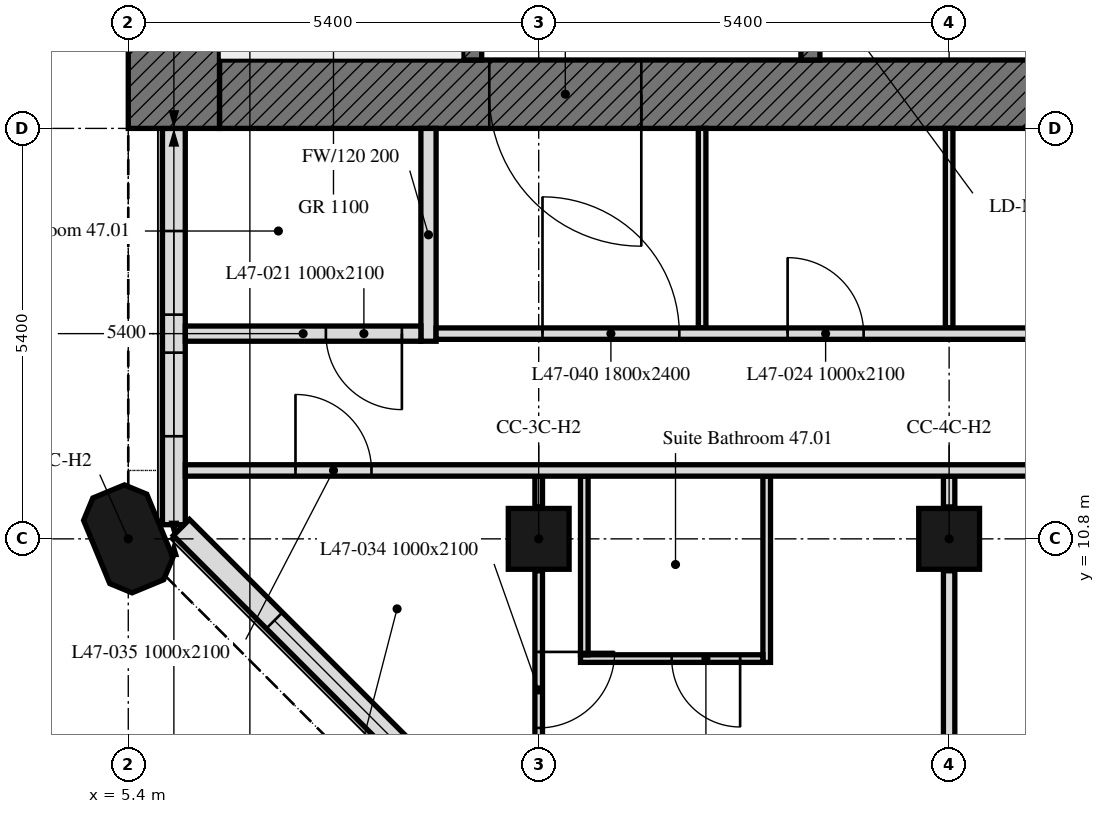
"""IFC4 building model, lengths in metres.
Left out: names, types, materials, properties, quantities, classifications, styles, units other than length and angle.
Written with IfcOpenShell. Run it as: python <this file> out.ifc"""

import sys

from ifc_helpers import new_model, si_unit, direction, frame, frame_2d, origin, origin_2d, place, context, subcontext, project, spatial, polyline, rectangle, outline, extrude, element, fill, save


model = new_model("IFC4")
c1 = context("Model", 3, precision=1e-05, world=origin(), true_north=direction((0.0, 1.0)))
c2 = subcontext(c1, "Body", "Model", "MODEL_VIEW")
j1 = project(units=[si_unit("LENGTHUNIT", "METRE"), si_unit("PLANEANGLEUNIT", "RADIAN")], contexts=[c1])
p1 = place(None, origin())
s1 = spatial("IfcSite", under=j1, at=p1, CompositionType="ELEMENT")
p2 = place(p1, origin())
s2 = spatial("IfcBuilding", under=s1, at=p2, CompositionType="ELEMENT")
p3 = place(p2, frame((0.0, 0.0, 193.9)))
s3 = spatial("IfcBuildingStorey", under=s2, at=p3, CompositionType="ELEMENT", Elevation=193.9)
p4 = place(p3, frame((5.4, 10.8, 0.0), z_axis=(0.0, 0.0, 1.0), x_axis=(-0.382683432365, 0.923879532511, 0.0)))
e1 = element("IfcColumn", 1, at=p4, inside=s3, PredefinedType="COLUMN", context=c2, shape_type="SweptSolid", body=[
    extrude(outline(polyline([(-0.45, -0.45), (0.45, -0.45), (0.675, -0.225), (0.675, 0.225), (0.45, 0.45), (-0.45, 0.45), (-0.675, 0.225), (-0.675, -0.225), (-0.45, -0.45)])), origin(), (0.0, 0.0, 1.0), 3.0),
])
for number, where, z_axis, x_axis in (
    (2, (10.8, 10.8, 0.0), (0.0, 0.0, 1.0), (1.0, 0.0, 0.0)),
    (3, (16.2, 10.8, 0.0), (0.0, 0.0, 1.0), (1.0, 0.0, 0.0)),
):
    element("IfcColumn", number, at=place(p3, frame(where, z_axis=z_axis, x_axis=x_axis)), inside=s3, PredefinedType="COLUMN", context=c2, shape_type="SweptSolid", body=[
        extrude(rectangle(XDim=0.8, YDim=0.8, at=origin_2d()), origin(), (0.0, 0.0, 1.0), 3.0),
    ])
p5 = place(p3, frame((6.0, 16.2, 0.0), z_axis=(0.0, 0.0, 1.0), x_axis=(0.0, -1.0, 0.0)))
e4 = element("IfcWall", 4, at=p5, inside=s3, PredefinedType="SOLIDWALL", context=c2, shape_type="SweptSolid", body=[
    extrude(rectangle(XDim=5.214, YDim=0.3, at=frame_2d((2.607, 0.0))), origin(), (0.0, 0.0, 1.0), 3.0),
])
p6 = place(p5, frame((1.35, 0.0, 0.9)))
e5 = element("IfcOpeningElement", 5, at=p6, cuts=e4, PredefinedType="OPENING", context=c2, shape_type="SweptSolid", body=[
    extrude(rectangle(XDim=1.1, YDim=1.7, at=frame_2d((0.55, 0.85))), frame((0.0, 0.16, 0.0), z_axis=(0.0, -1.0, 0.0), x_axis=(1.0, 0.0, 0.0)), (0.0, 0.0, 1.0), 0.32),
])
p7 = place(p5, frame((2.95, 0.0, 0.9)))
e6 = element("IfcOpeningElement", 6, at=p7, cuts=e4, PredefinedType="OPENING", context=c2, shape_type="SweptSolid", body=[
    extrude(rectangle(XDim=1.1, YDim=1.7, at=frame_2d((0.55, 0.85))), frame((0.0, 0.16, 0.0), z_axis=(0.0, -1.0, 0.0), x_axis=(1.0, 0.0, 0.0)), (0.0, 0.0, 1.0), 0.32),
])
p8 = place(p3, frame((6.099, 10.949, 0.0), z_axis=(0.0, 0.0, 1.0), x_axis=(0.707106781187, -0.707106781187, 0.0)))
e7 = element("IfcWall", 7, at=p8, inside=s3, PredefinedType="SOLIDWALL", context=c2, shape_type="SweptSolid", body=[
    extrude(rectangle(XDim=6.86, YDim=0.3, at=frame_2d((3.43, 0.0))), origin(), (0.0, 0.0, 1.0), 3.0),
])
p9 = place(p8, frame((1.73, 0.0, 0.9)))
e8 = element("IfcOpeningElement", 8, at=p9, cuts=e7, PredefinedType="OPENING", context=c2, shape_type="SweptSolid", body=[
    extrude(rectangle(XDim=3.4, YDim=1.7, at=frame_2d((1.7, 0.85))), frame((0.0, 0.16, 0.0), z_axis=(0.0, -1.0, 0.0), x_axis=(1.0, 0.0, 0.0)), (0.0, 0.0, 1.0), 0.32),
])
p10 = place(p3, frame((17.7, 16.65, 0.0), z_axis=(0.0, 0.0, 1.0), x_axis=(-1.0, 0.0, 0.0)))
e9 = element("IfcWall", 9, at=p10, inside=s3, PredefinedType="SOLIDWALL", context=c2, shape_type="SweptSolid", body=[
    extrude(rectangle(XDim=11.1, YDim=0.9, at=frame_2d((5.55, 0.0))), origin(), (0.0, 0.0, 1.0), 3.0),
])
p11 = place(p10, frame((5.55, 0.0, 0.0)))
e10 = element("IfcOpeningElement", 10, at=p11, cuts=e9, PredefinedType="OPENING", context=c2, shape_type="SweptSolid", body=[
    extrude(rectangle(XDim=2.0, YDim=2.4, at=frame_2d((1.0, 1.2))), frame((0.0, 0.45, 0.0), z_axis=(0.0, -1.0, 0.0), x_axis=(1.0, 0.0, 0.0)), (0.0, 0.0, 1.0), 0.9),
])
p12 = place(p3, frame((6.0, 16.2, 0.0), z_axis=(0.0, 0.0, 1.0), x_axis=(0.0, 1.0, 0.0)))
e11 = element("IfcWall", 11, at=p12, inside=s3, PredefinedType="SOLIDWALL", context=c2, shape_type="SweptSolid", body=[
    extrude(rectangle(XDim=16.2, YDim=1.2, at=frame_2d((8.1, 0.0))), origin(), (0.0, 0.0, 1.0), 3.0),
])
p13 = place(p3, frame((9.925, 17.1, 0.0), z_axis=(0.0, 0.0, 1.0), x_axis=(0.0, 1.0, 0.0)))
e12 = element("IfcWall", 12, at=p13, inside=s3, PredefinedType="SOLIDWALL", context=c2, shape_type="SweptSolid", body=[
    extrude(rectangle(XDim=14.4, YDim=0.25, at=frame_2d((7.2, 0.0))), origin(), (0.0, 0.0, 1.0), 3.0),
])
p14 = place(p13, frame((4.6, 0.0, 0.0)))
e13 = element("IfcOpeningElement", 13, at=p14, cuts=e12, PredefinedType="OPENING", context=c2, shape_type="SweptSolid", body=[
    extrude(rectangle(XDim=1.0, YDim=2.1, at=frame_2d((0.5, 1.05))), frame((0.0, 0.125, 0.0), z_axis=(0.0, -1.0, 0.0), x_axis=(1.0, 0.0, 0.0)), (0.0, 0.0, 1.0), 0.25),
])
p15 = place(p13, frame((7.062, 0.0, 0.0)))
e14 = element("IfcOpeningElement", 14, at=p15, cuts=e12, PredefinedType="OPENING", context=c2, shape_type="SweptSolid", body=[
    extrude(rectangle(XDim=1.2, YDim=2.1, at=frame_2d((0.6, 1.05))), frame((0.0, 0.125, 0.0), z_axis=(0.0, -1.0, 0.0), x_axis=(1.0, 0.0, 0.0)), (0.0, 0.0, 1.0), 0.25),
])
p16 = place(p13, frame((9.472, 0.0, 0.0)))
e15 = element("IfcOpeningElement", 15, at=p16, cuts=e12, PredefinedType="OPENING", context=c2, shape_type="SweptSolid", body=[
    extrude(rectangle(XDim=0.9, YDim=2.1, at=frame_2d((0.45, 1.05))), frame((0.0, 0.125, 0.0), z_axis=(0.0, -1.0, 0.0), x_axis=(1.0, 0.0, 0.0)), (0.0, 0.0, 1.0), 0.25),
])
p17 = place(p13, frame((10.779, 0.0, 0.0)))
e16 = element("IfcOpeningElement", 16, at=p17, cuts=e12, PredefinedType="OPENING", context=c2, shape_type="SweptSolid", body=[
    extrude(rectangle(XDim=0.9, YDim=2.1, at=frame_2d((0.45, 1.05))), frame((0.0, 0.125, 0.0), z_axis=(0.0, -1.0, 0.0), x_axis=(1.0, 0.0, 0.0)), (0.0, 0.0, 1.0), 0.25),
])
p18 = place(p13, frame((12.048, 0.0, 0.0)))
e17 = element("IfcOpeningElement", 17, at=p18, cuts=e12, PredefinedType="OPENING", context=c2, shape_type="SweptSolid", body=[
    extrude(rectangle(XDim=0.9, YDim=2.1, at=frame_2d((0.45, 1.05))), frame((0.0, 0.125, 0.0), z_axis=(0.0, -1.0, 0.0), x_axis=(1.0, 0.0, 0.0)), (0.0, 0.0, 1.0), 0.25),
])
p19 = place(p13, frame((13.354, 0.0, 0.0)))
e18 = element("IfcOpeningElement", 18, at=p19, cuts=e12, PredefinedType="OPENING", context=c2, shape_type="SweptSolid", body=[
    extrude(rectangle(XDim=0.9, YDim=2.1, at=frame_2d((0.45, 1.05))), frame((0.0, 0.125, 0.0), z_axis=(0.0, -1.0, 0.0), x_axis=(1.0, 0.0, 0.0)), (0.0, 0.0, 1.0), 0.25),
])
p20 = place(p3, frame((14.375, 17.1, 0.0), z_axis=(0.0, 0.0, 1.0), x_axis=(0.0, 1.0, 0.0)))
e19 = element("IfcWall", 19, at=p20, inside=s3, PredefinedType="SOLIDWALL", context=c2, shape_type="SweptSolid", body=[
    extrude(rectangle(XDim=14.4, YDim=0.25, at=frame_2d((7.2, 0.0))), origin(), (0.0, 0.0, 1.0), 3.0),
])
p21 = place(p20, frame((13.15, 0.0, 0.0)))
e20 = element("IfcOpeningElement", 20, at=p21, cuts=e19, PredefinedType="OPENING", context=c2, shape_type="SweptSolid", body=[
    extrude(rectangle(XDim=1.0, YDim=2.1, at=frame_2d((0.5, 1.05))), frame((0.0, 0.125, 0.0), z_axis=(0.0, -1.0, 0.0), x_axis=(1.0, 0.0, 0.0)), (0.0, 0.0, 1.0), 0.25),
])
p22 = place(p20, frame((0.6, 0.0, 0.0)))
e21 = element("IfcOpeningElement", 21, at=p22, cuts=e19, PredefinedType="OPENING", context=c2, shape_type="SweptSolid", body=[
    extrude(rectangle(XDim=1.1, YDim=2.1, at=frame_2d((0.55, 1.05))), frame((0.0, 0.125, 0.0), z_axis=(0.0, -1.0, 0.0), x_axis=(1.0, 0.0, 0.0)), (0.0, 0.0, 1.0), 0.25),
])
p23 = place(p20, frame((3.25, 0.0, 0.0)))
e22 = element("IfcOpeningElement", 22, at=p23, cuts=e19, PredefinedType="OPENING", context=c2, shape_type="SweptSolid", body=[
    extrude(rectangle(XDim=0.9, YDim=2.1, at=frame_2d((0.45, 1.05))), frame((0.0, 0.125, 0.0), z_axis=(0.0, -1.0, 0.0), x_axis=(1.0, 0.0, 0.0)), (0.0, 0.0, 1.0), 0.25),
])
p24 = place(p3, frame((16.2, 6.151, 0.0), z_axis=(0.0, 0.0, 1.0), x_axis=(0.0, 1.0, 0.0)))
e23 = element("IfcWall", 23, at=p24, inside=s3, PredefinedType="PARTITIONING", context=c2, shape_type="SweptSolid", body=[
    extrude(rectangle(XDim=4.229, YDim=0.15, at=frame_2d((2.115, 0.0))), origin(), (0.0, 0.0, 1.0), 3.0),
])
p25 = place(p3, frame((16.2, 11.22, 0.0), z_axis=(0.0, 0.0, 1.0), x_axis=(0.0, 1.0, 0.0)))
e24 = element("IfcWall", 24, at=p25, inside=s3, PredefinedType="PARTITIONING", context=c2, shape_type="SweptSolid", body=[
    extrude(rectangle(XDim=0.405, YDim=0.15, at=frame_2d((0.203, 0.0))), origin(), (0.0, 0.0, 1.0), 3.0),
])
p26 = place(p3, frame((13.8, 11.625, 0.0), z_axis=(0.0, 0.0, 1.0), x_axis=(0.0, -1.0, 0.0)))
e25 = element("IfcWall", 25, at=p26, inside=s3, PredefinedType="PARTITIONING", context=c2, shape_type="SweptSolid", body=[
    extrude(rectangle(XDim=2.45, YDim=0.1, at=frame_2d((1.225, 0.0))), origin(), (0.0, 0.0, 1.0), 3.0),
])
p27 = place(p3, frame((13.75, 9.225, 0.0), z_axis=(0.0, 0.0, 1.0), x_axis=(-1.0, 0.0, 0.0)))
e26 = element("IfcWall", 26, at=p27, inside=s3, PredefinedType="PARTITIONING", context=c2, shape_type="SweptSolid", body=[
    extrude(rectangle(XDim=2.4, YDim=0.1, at=frame_2d((1.2, 0.0))), origin(), (0.0, 0.0, 1.0), 3.0),
])
p28 = place(p27, frame((0.3, 0.0, 0.0)))
e27 = element("IfcOpeningElement", 27, at=p28, cuts=e26, PredefinedType="OPENING", context=c2, shape_type="SweptSolid", body=[
    extrude(rectangle(XDim=0.9, YDim=2.1, at=frame_2d((0.45, 1.05))), frame((0.0, 0.05, 0.0), z_axis=(0.0, -1.0, 0.0), x_axis=(1.0, 0.0, 0.0)), (0.0, 0.0, 1.0), 0.1),
])
p29 = place(p3, frame((11.4, 9.275, 0.0), z_axis=(0.0, 0.0, 1.0), x_axis=(0.0, 1.0, 0.0)))
e28 = element("IfcWall", 28, at=p29, inside=s3, PredefinedType="PARTITIONING", context=c2, shape_type="SweptSolid", body=[
    extrude(rectangle(XDim=2.35, YDim=0.1, at=frame_2d((1.175, 0.0))), origin(), (0.0, 0.0, 1.0), 3.0),
])
p30 = place(p3, frame((10.8, 11.625, 0.0), z_axis=(0.0, 0.0, 1.0), x_axis=(0.0, -1.0, 0.0)))
e29 = element("IfcWall", 29, at=p30, inside=s3, PredefinedType="PARTITIONING", context=c2, shape_type="SweptSolid", body=[
    extrude(rectangle(XDim=0.405, YDim=0.1, at=frame_2d((0.203, 0.0))), origin(), (0.0, 0.0, 1.0), 3.0),
])
p31 = place(p3, frame((10.8, 10.38, 0.0), z_axis=(0.0, 0.0, 1.0), x_axis=(0.0, -1.0, 0.0)))
e30 = element("IfcWall", 30, at=p31, inside=s3, PredefinedType="PARTITIONING", context=c2, shape_type="SweptSolid", body=[
    extrude(rectangle(XDim=3.868, YDim=0.1, at=frame_2d((1.934, 0.0))), origin(), (0.0, 0.0, 1.0), 3.0),
])
p32 = place(p31, frame((1.067, 0.0, 0.0)))
e31 = element("IfcOpeningElement", 31, at=p32, cuts=e30, PredefinedType="OPENING", context=c2, shape_type="SweptSolid", body=[
    extrude(rectangle(XDim=1.0, YDim=2.1, at=frame_2d((0.5, 1.05))), frame((0.0, 0.05, 0.0), z_axis=(0.0, -1.0, 0.0), x_axis=(1.0, 0.0, 0.0)), (0.0, 0.0, 1.0), 0.1),
])
p33 = place(p3, frame((6.151, 11.7, 0.0), z_axis=(0.0, 0.0, 1.0), x_axis=(1.0, 0.0, 0.0)))
e32 = element("IfcWall", 32, at=p33, inside=s3, PredefinedType="PARTITIONING", context=c2, shape_type="SweptSolid", body=[
    extrude(rectangle(XDim=41.698, YDim=0.15, at=frame_2d((20.849, 0.0))), origin(), (0.0, 0.0, 1.0), 3.0),
])
p34 = place(p33, frame((17.649, 0.0, 0.0)))
e33 = element("IfcOpeningElement", 33, at=p34, cuts=e32, PredefinedType="OPENING", context=c2, shape_type="SweptSolid", body=[
    extrude(rectangle(XDim=1.0, YDim=2.1, at=frame_2d((0.5, 1.05))), frame((0.0, 0.075, 0.0), z_axis=(0.0, -1.0, 0.0), x_axis=(1.0, 0.0, 0.0)), (0.0, 0.0, 1.0), 0.15),
])
p35 = place(p33, frame((1.449, 0.0, 0.0)))
e34 = element("IfcOpeningElement", 34, at=p35, cuts=e32, PredefinedType="OPENING", context=c2, shape_type="SweptSolid", body=[
    extrude(rectangle(XDim=1.0, YDim=2.1, at=frame_2d((0.5, 1.05))), frame((0.0, 0.075, 0.0), z_axis=(0.0, -1.0, 0.0), x_axis=(1.0, 0.0, 0.0)), (0.0, 0.0, 1.0), 0.15),
])
p36 = place(p33, frame((29.249, 0.0, 0.0)))
e35 = element("IfcOpeningElement", 35, at=p36, cuts=e32, PredefinedType="OPENING", context=c2, shape_type="SweptSolid", body=[
    extrude(rectangle(XDim=1.0, YDim=2.1, at=frame_2d((0.5, 1.05))), frame((0.0, 0.075, 0.0), z_axis=(0.0, -1.0, 0.0), x_axis=(1.0, 0.0, 0.0)), (0.0, 0.0, 1.0), 0.15),
])
p37 = place(p33, frame((37.954, 0.0, 0.0)))
e36 = element("IfcOpeningElement", 36, at=p37, cuts=e32, PredefinedType="OPENING", context=c2, shape_type="SweptSolid", body=[
    extrude(rectangle(XDim=1.0, YDim=2.1, at=frame_2d((0.5, 1.05))), frame((0.0, 0.075, 0.0), z_axis=(0.0, -1.0, 0.0), x_axis=(1.0, 0.0, 0.0)), (0.0, 0.0, 1.0), 0.15),
])
p38 = place(p3, frame((16.2, 16.2, 0.0), z_axis=(0.0, 0.0, 1.0), x_axis=(0.0, -1.0, 0.0)))
e37 = element("IfcWall", 37, at=p38, inside=s3, PredefinedType="PARTITIONING", context=c2, shape_type="SweptSolid", body=[
    extrude(rectangle(XDim=2.625, YDim=0.1, at=frame_2d((1.312, 0.0))), origin(), (0.0, 0.0, 1.0), 3.0),
])
p39 = place(p3, frame((9.35, 16.2, 0.0), z_axis=(0.0, 0.0, 1.0), x_axis=(0.0, -1.0, 0.0)))
e38 = element("IfcWall", 38, at=p39, inside=s3, PredefinedType="PARTITIONING", context=c2, shape_type="SweptSolid", body=[
    extrude(rectangle(XDim=2.8, YDim=0.2, at=frame_2d((1.4, 0.0))), origin(), (0.0, 0.0, 1.0), 3.0),
])
p40 = place(p3, frame((12.95, 13.575, 0.0), z_axis=(0.0, 0.0, 1.0), x_axis=(0.0, 1.0, 0.0)))
e39 = element("IfcWall", 39, at=p40, inside=s3, PredefinedType="PARTITIONING", context=c2, shape_type="SweptSolid", body=[
    extrude(rectangle(XDim=2.625, YDim=0.1, at=frame_2d((1.312, 0.0))), origin(), (0.0, 0.0, 1.0), 3.0),
])
p41 = place(p3, frame((9.45, 13.5, 0.0), z_axis=(0.0, 0.0, 1.0), x_axis=(1.0, 0.0, 0.0)))
e40 = element("IfcWall", 40, at=p41, inside=s3, PredefinedType="PARTITIONING", context=c2, shape_type="SweptSolid", body=[
    extrude(rectangle(XDim=33.675, YDim=0.15, at=frame_2d((16.837, 0.0))), origin(), (0.0, 0.0, 1.0), 3.0),
])
p42 = place(p41, frame((8.95, 0.0, 0.0)))
e41 = element("IfcOpeningElement", 41, at=p42, cuts=e40, PredefinedType="OPENING", context=c2, shape_type="SweptSolid", body=[
    extrude(rectangle(XDim=1.0, YDim=2.1, at=frame_2d((0.5, 1.05))), frame((0.0, 0.075, 0.0), z_axis=(0.0, -1.0, 0.0), x_axis=(1.0, 0.0, 0.0)), (0.0, 0.0, 1.0), 0.15),
])
p43 = place(p41, frame((15.517, 0.0, 0.0)))
e42 = element("IfcOpeningElement", 42, at=p43, cuts=e40, PredefinedType="OPENING", context=c2, shape_type="SweptSolid", body=[
    extrude(rectangle(XDim=1.0, YDim=2.1, at=frame_2d((0.5, 1.05))), frame((0.0, 0.075, 0.0), z_axis=(0.0, -1.0, 0.0), x_axis=(1.0, 0.0, 0.0)), (0.0, 0.0, 1.0), 0.15),
])
p44 = place(p41, frame((24.075, 0.0, 0.0)))
e43 = element("IfcOpeningElement", 43, at=p44, cuts=e40, PredefinedType="OPENING", context=c2, shape_type="SweptSolid", body=[
    extrude(rectangle(XDim=1.0, YDim=2.1, at=frame_2d((0.5, 1.05))), frame((0.0, 0.075, 0.0), z_axis=(0.0, -1.0, 0.0), x_axis=(1.0, 0.0, 0.0)), (0.0, 0.0, 1.0), 0.15),
])
p45 = place(p41, frame((31.275, 0.0, 0.0)))
e44 = element("IfcOpeningElement", 44, at=p45, cuts=e40, PredefinedType="OPENING", context=c2, shape_type="SweptSolid", body=[
    extrude(rectangle(XDim=1.0, YDim=2.1, at=frame_2d((0.5, 1.05))), frame((0.0, 0.075, 0.0), z_axis=(0.0, -1.0, 0.0), x_axis=(1.0, 0.0, 0.0)), (0.0, 0.0, 1.0), 0.15),
])
p46 = place(p41, frame((4.625, 0.0, 0.0)))
e45 = element("IfcOpeningElement", 45, at=p46, cuts=e40, PredefinedType="OPENING", context=c2, shape_type="SweptSolid", body=[
    extrude(rectangle(XDim=1.0, YDim=2.1, at=frame_2d((0.5, 1.05))), frame((0.0, 0.075, 0.0), z_axis=(0.0, -1.0, 0.0), x_axis=(1.0, 0.0, 0.0)), (0.0, 0.0, 1.0), 0.15),
])
p47 = place(p41, frame((1.4, 0.0, 0.0)))
e46 = element("IfcOpeningElement", 46, at=p47, cuts=e40, PredefinedType="OPENING", context=c2, shape_type="SweptSolid", body=[
    extrude(rectangle(XDim=1.8, YDim=2.4, at=frame_2d((0.9, 1.2))), frame((0.0, 0.075, 0.0), z_axis=(0.0, -1.0, 0.0), x_axis=(1.0, 0.0, 0.0)), (0.0, 0.0, 1.0), 0.15),
])
p48 = place(p41, frame((26.5, 0.0, 0.0)))
e47 = element("IfcOpeningElement", 47, at=p48, cuts=e40, PredefinedType="OPENING", context=c2, shape_type="SweptSolid", body=[
    extrude(rectangle(XDim=1.8, YDim=2.4, at=frame_2d((0.9, 1.2))), frame((0.0, 0.075, 0.0), z_axis=(0.0, -1.0, 0.0), x_axis=(1.0, 0.0, 0.0)), (0.0, 0.0, 1.0), 0.15),
])
p49 = place(p3, frame((9.25, 13.5, 0.0), z_axis=(0.0, 0.0, 1.0), x_axis=(-1.0, 0.0, 0.0)))
e48 = element("IfcWall", 48, at=p49, inside=s3, PredefinedType="PARTITIONING", context=c2, shape_type="SweptSolid", body=[
    extrude(rectangle(XDim=3.099, YDim=0.2, at=frame_2d((1.55, 0.0))), origin(), (0.0, 0.0, 1.0), 3.0),
])
p50 = place(p49, frame((0.25, 0.0, 0.0)))
e49 = element("IfcOpeningElement", 49, at=p50, cuts=e48, PredefinedType="OPENING", context=c2, shape_type="SweptSolid", body=[
    extrude(rectangle(XDim=1.0, YDim=2.1, at=frame_2d((0.5, 1.05))), frame((0.0, 0.1, 0.0), z_axis=(0.0, -1.0, 0.0), x_axis=(1.0, 0.0, 0.0)), (0.0, 0.0, 1.0), 0.2),
])
p51 = place(p6, origin())
e50 = element("IfcWindow", 50, at=p51, inside=s3, PartitioningType="SINGLE_PANEL", PredefinedType="WINDOW", context=c2, shape_type="SweptSolid", body=[
    extrude(rectangle(XDim=1.1, YDim=1.7, at=frame_2d((0.55, 0.85))), frame((0.0, 0.03, 0.0), z_axis=(0.0, -1.0, 0.0), x_axis=(1.0, 0.0, 0.0)), (0.0, 0.0, 1.0), 0.06),
])
fill(e5, e50)
p52 = place(p7, origin())
e51 = element("IfcWindow", 51, at=p52, inside=s3, PartitioningType="SINGLE_PANEL", PredefinedType="WINDOW", context=c2, shape_type="SweptSolid", body=[
    extrude(rectangle(XDim=1.1, YDim=1.7, at=frame_2d((0.55, 0.85))), frame((0.0, 0.03, 0.0), z_axis=(0.0, -1.0, 0.0), x_axis=(1.0, 0.0, 0.0)), (0.0, 0.0, 1.0), 0.06),
])
fill(e6, e51)
p53 = place(p9, origin())
e52 = element("IfcWindow", 52, at=p53, inside=s3, PartitioningType="SINGLE_PANEL", PredefinedType="WINDOW", context=c2, shape_type="SweptSolid", body=[
    extrude(rectangle(XDim=3.4, YDim=1.7, at=frame_2d((1.7, 0.85))), frame((0.0, 0.03, 0.0), z_axis=(0.0, -1.0, 0.0), x_axis=(1.0, 0.0, 0.0)), (0.0, 0.0, 1.0), 0.06),
])
fill(e8, e52)
p54 = place(p11, origin())
e53 = element("IfcDoor", 53, at=p54, inside=s3, OperationType="DOUBLE_DOOR_SINGLE_SWING", PredefinedType="DOOR", context=c2, shape_type="SweptSolid", body=[
    extrude(rectangle(XDim=2.0, YDim=2.4, at=frame_2d((1.0, 1.2))), frame((0.0, 0.025, 0.0), z_axis=(0.0, -1.0, 0.0), x_axis=(1.0, 0.0, 0.0)), (0.0, 0.0, 1.0), 0.05),
])
fill(e10, e53)
p55 = place(p28, origin())
e54 = element("IfcDoor", 54, at=p55, inside=s3, OperationType="SINGLE_SWING_RIGHT", PredefinedType="DOOR", context=c2, shape_type="SweptSolid", body=[
    extrude(rectangle(XDim=0.9, YDim=2.1, at=frame_2d((0.45, 1.05))), frame((0.0, 0.025, 0.0), z_axis=(0.0, -1.0, 0.0), x_axis=(1.0, 0.0, 0.0)), (0.0, 0.0, 1.0), 0.05),
])
fill(e27, e54)
p56 = place(p50, origin())
e55 = element("IfcDoor", 55, at=p56, inside=s3, OperationType="SINGLE_SWING_RIGHT", PredefinedType="DOOR", context=c2, shape_type="SweptSolid", body=[
    extrude(rectangle(XDim=1.0, YDim=2.1, at=frame_2d((0.5, 1.05))), frame((0.0, 0.025, 0.0), z_axis=(0.0, -1.0, 0.0), x_axis=(1.0, 0.0, 0.0)), (0.0, 0.0, 1.0), 0.05),
])
fill(e49, e55)
p57 = place(p46, origin())
e56 = element("IfcDoor", 56, at=p57, inside=s3, OperationType="SINGLE_SWING_LEFT", PredefinedType="DOOR", context=c2, shape_type="SweptSolid", body=[
    extrude(rectangle(XDim=1.0, YDim=2.1, at=frame_2d((0.5, 1.05))), frame((0.0, 0.025, 0.0), z_axis=(0.0, -1.0, 0.0), x_axis=(1.0, 0.0, 0.0)), (0.0, 0.0, 1.0), 0.05),
])
fill(e45, e56)
p58 = place(p32, origin())
e57 = element("IfcDoor", 57, at=p58, inside=s3, OperationType="SINGLE_SWING_RIGHT", PredefinedType="DOOR", context=c2, shape_type="SweptSolid", body=[
    extrude(rectangle(XDim=1.0, YDim=2.1, at=frame_2d((0.5, 1.05))), frame((0.0, 0.025, 0.0), z_axis=(0.0, -1.0, 0.0), x_axis=(1.0, 0.0, 0.0)), (0.0, 0.0, 1.0), 0.05),
])
fill(e31, e57)
p59 = place(p35, origin())
e58 = element("IfcDoor", 58, at=p59, inside=s3, OperationType="SINGLE_SWING_LEFT", PredefinedType="DOOR", context=c2, shape_type="SweptSolid", body=[
    extrude(rectangle(XDim=1.0, YDim=2.1, at=frame_2d((0.5, 1.05))), frame((0.0, 0.025, 0.0), z_axis=(0.0, -1.0, 0.0), x_axis=(1.0, 0.0, 0.0)), (0.0, 0.0, 1.0), 0.05),
])
fill(e34, e58)
p60 = place(p47, origin())
e59 = element("IfcDoor", 59, at=p60, inside=s3, OperationType="DOUBLE_DOOR_SINGLE_SWING", PredefinedType="DOOR", context=c2, shape_type="SweptSolid", body=[
    extrude(rectangle(XDim=1.8, YDim=2.4, at=frame_2d((0.9, 1.2))), frame((0.0, 0.025, 0.0), z_axis=(0.0, -1.0, 0.0), x_axis=(1.0, 0.0, 0.0)), (0.0, 0.0, 1.0), 0.05),
])
fill(e46, e59)
save(model, sys.argv[1])
